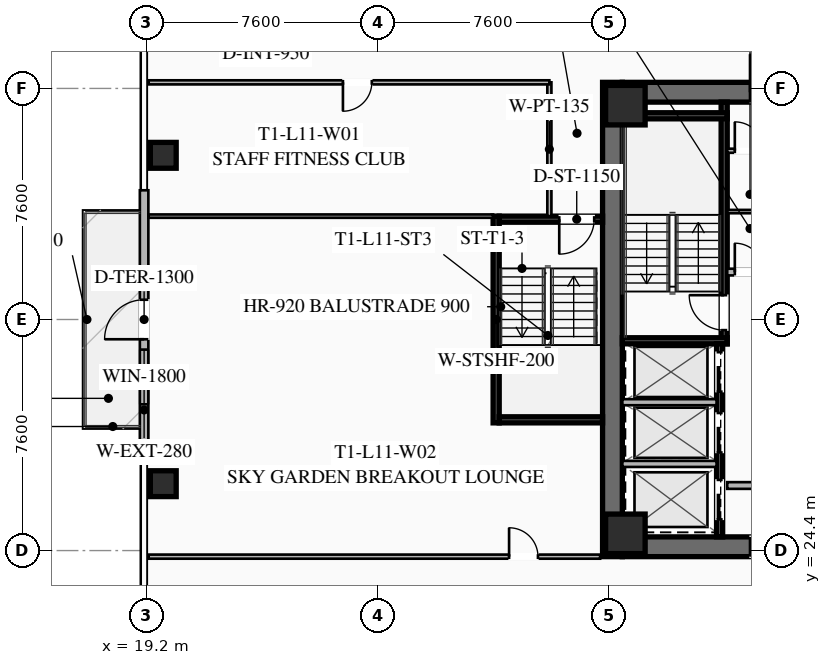
"""IFC4 building model, lengths in metres.
Left out: names, types, materials, properties, quantities, classifications, styles, units other than length and angle.
Written with IfcOpenShell. Run it as: python <this file> out.ifc"""

import sys

from ifc_helpers import new_model, si_unit, direction, frame, frame_2d, origin, origin_2d, place, context, subcontext, project, spatial, rectangle, hollow_rectangle, extrude, element, fill, save


model = new_model("IFC4")
c1 = context("Model", 3, precision=1e-05, world=origin(), true_north=direction((0.0, 1.0)))
c2 = subcontext(c1, "Body", "Model", "MODEL_VIEW")
j1 = project(units=[si_unit("LENGTHUNIT", "METRE"), si_unit("PLANEANGLEUNIT", "RADIAN")], contexts=[c1])
p1 = place(None, origin())
s1 = spatial("IfcSite", under=j1, at=p1, CompositionType="ELEMENT")
p2 = place(p1, origin())
s2 = spatial("IfcBuilding", under=s1, at=p2, CompositionType="ELEMENT")
p3 = place(p2, frame((0.0, 0.0, 45.9)))
s3 = spatial("IfcBuildingStorey", under=s2, at=p3, CompositionType="ELEMENT", Elevation=45.9)
p4 = place(p3, frame((34.525, 24.2, 0.0), z_axis=(0.0, 0.0, 1.0), x_axis=(0.0, 1.0, 0.0)))
e1 = element("IfcWall", 1, at=p4, inside=s3, PredefinedType="SHEAR", context=c2, shape_type="SweptSolid", body=[
    extrude(rectangle(XDim=15.6, YDim=0.65, at=frame_2d((7.8, 0.0))), origin(), (0.0, 0.0, 1.0), 3.55),
])
p5 = place(p3, frame((49.15, 24.525, 0.0), z_axis=(0.0, 0.0, 1.0), x_axis=(-1.0, 0.0, 0.0)))
e2 = element("IfcWall", 2, at=p5, inside=s3, PredefinedType="SHEAR", context=c2, shape_type="SweptSolid", body=[
    extrude(rectangle(XDim=14.3, YDim=0.65, at=frame_2d((7.15, 0.0))), origin(), (0.0, 0.0, 1.0), 3.55),
])
p6 = place(p5, frame((8.85, 0.0, 0.0)))
e3 = element("IfcOpeningElement", 3, at=p6, cuts=e2, PredefinedType="OPENING", context=c2, shape_type="SweptSolid", body=[
    extrude(rectangle(XDim=1.25, YDim=2.25, at=frame_2d((0.625, 1.125))), frame((0.0, 0.335, 0.0), z_axis=(0.0, -1.0, 0.0), x_axis=(1.0, 0.0, 0.0)), (0.0, 0.0, 1.0), 0.67),
])
p7 = place(p5, frame((3.8, 0.0, 0.0)))
e4 = element("IfcOpeningElement", 4, at=p7, cuts=e2, PredefinedType="OPENING", context=c2, shape_type="SweptSolid", body=[
    extrude(rectangle(XDim=1.25, YDim=2.25, at=frame_2d((0.625, 1.125))), frame((0.0, 0.335, 0.0), z_axis=(0.0, -1.0, 0.0), x_axis=(1.0, 0.0, 0.0)), (0.0, 0.0, 1.0), 0.67),
])
p8 = place(p3, frame((34.85, 39.475, 0.0), z_axis=(0.0, 0.0, 1.0), x_axis=(1.0, 0.0, 0.0)))
e5 = element("IfcWall", 5, at=p8, inside=s3, PredefinedType="SHEAR", context=c2, shape_type="SweptSolid", body=[
    extrude(rectangle(XDim=14.3, YDim=0.65, at=frame_2d((7.15, 0.0))), origin(), (0.0, 0.0, 1.0), 3.55),
])
p9 = place(p8, frame((4.2, 0.0, 0.0)))
e6 = element("IfcOpeningElement", 6, at=p9, cuts=e5, PredefinedType="OPENING", context=c2, shape_type="SweptSolid", body=[
    extrude(rectangle(XDim=1.25, YDim=2.25, at=frame_2d((0.625, 1.125))), frame((0.0, 0.335, 0.0), z_axis=(0.0, -1.0, 0.0), x_axis=(1.0, 0.0, 0.0)), (0.0, 0.0, 1.0), 0.67),
])
p10 = place(p8, frame((9.25, 0.0, 0.0)))
e7 = element("IfcOpeningElement", 7, at=p10, cuts=e5, PredefinedType="OPENING", context=c2, shape_type="SweptSolid", body=[
    extrude(rectangle(XDim=1.25, YDim=2.25, at=frame_2d((0.625, 1.125))), frame((0.0, 0.335, 0.0), z_axis=(0.0, -1.0, 0.0), x_axis=(1.0, 0.0, 0.0)), (0.0, 0.0, 1.0), 0.67),
])
for number, where, z_axis, x_axis in (
    (8, (34.95, 24.95, 0.0), (0.0, 0.0, 1.0), (1.0, 0.0, 0.0)),
    (9, (34.95, 39.05, 0.0), (0.0, 0.0, 1.0), (1.0, 0.0, 0.0)),
):
    element("IfcColumn", number, at=place(p3, frame(where, z_axis=z_axis, x_axis=x_axis)), inside=s3, PredefinedType="COLUMN", context=c2, shape_type="SweptSolid", body=[
        extrude(hollow_rectangle(XDim=1.3, YDim=1.3, WallThickness=0.05, at=origin_2d()), origin(), (0.0, 0.0, 1.0), 3.35),
    ])
for number, where, z_axis, x_axis in (
    (10, (19.75, 37.4, 0.0), (0.0, 0.0, 1.0), (1.0, 0.0, 0.0)),
    (11, (19.75, 26.6, 0.0), (0.0, 0.0, 1.0), (1.0, 0.0, 0.0)),
):
    element("IfcColumn", number, at=place(p3, frame(where, z_axis=z_axis, x_axis=x_axis)), inside=s3, PredefinedType="COLUMN", context=c2, shape_type="SweptSolid", body=[
        extrude(hollow_rectangle(XDim=0.85, YDim=0.85, WallThickness=0.035, at=origin_2d()), origin(), (0.0, 0.0, 1.0), 3.35),
    ])
p11 = place(p3, frame((19.12, 27.75, 0.0), z_axis=(0.0, 0.0, 1.0), x_axis=(0.0, 1.0, 0.0)))
e12 = element("IfcWall", 12, at=p11, inside=s3, PredefinedType="SOLIDWALL", context=c2, shape_type="SweptSolid", body=[
    extrude(rectangle(XDim=8.5, YDim=0.28, at=frame_2d((4.25, 0.0))), origin(), (0.0, 0.0, 1.0), 3.35),
])
p12 = place(p11, frame((3.6, 0.0, 0.0)))
e13 = element("IfcOpeningElement", 13, at=p12, cuts=e12, PredefinedType="OPENING", context=c2, shape_type="SweptSolid", body=[
    extrude(rectangle(XDim=1.3, YDim=2.15, at=frame_2d((0.65, 1.075))), frame((0.0, 0.15, 0.0), z_axis=(0.0, -1.0, 0.0), x_axis=(1.0, 0.0, 0.0)), (0.0, 0.0, 1.0), 0.3),
])
p13 = place(p11, frame((1.46, 0.0, 0.85)))
e14 = element("IfcOpeningElement", 14, at=p13, cuts=e12, PredefinedType="OPENING", context=c2, shape_type="SweptSolid", body=[
    extrude(rectangle(XDim=1.8, YDim=1.92, at=frame_2d((0.9, 0.96))), frame((0.0, 0.15, 0.0), z_axis=(0.0, -1.0, 0.0), x_axis=(1.0, 0.0, 0.0)), (0.0, 0.0, 1.0), 0.3),
])
p14 = place(p3, frame((38.2, 31.2, 0.0), z_axis=(0.0, 0.0, 1.0), x_axis=(0.0, 1.0, 0.0)))
e15 = element("IfcWall", 15, at=p14, inside=s3, PredefinedType="SHEAR", context=c2, shape_type="SweptSolid", body=[
    extrude(rectangle(XDim=7.95, YDim=0.2, at=frame_2d((3.975, 0.0))), origin(), (0.0, 0.0, 1.0), 3.35),
])
p15 = place(p14, frame((0.45, 0.0, 0.0)))
e16 = element("IfcOpeningElement", 16, at=p15, cuts=e15, PredefinedType="OPENING", context=c2, shape_type="SweptSolid", body=[
    extrude(rectangle(XDim=1.15, YDim=2.2, at=frame_2d((0.575, 1.1))), frame((0.0, 0.11, 0.0), z_axis=(0.0, -1.0, 0.0), x_axis=(1.0, 0.0, 0.0)), (0.0, 0.0, 1.0), 0.22),
])
for number, where, z_axis, x_axis in (
    (17, (34.85, 31.3, 0.0), (0.0, 0.0, 1.0), (1.0, 0.0, 0.0)),
    (18, (34.85, 38.7, 0.0), (0.0, 0.0, 1.0), (1.0, 0.0, 0.0)),
):
    element("IfcWall", number, at=place(p3, frame(where, z_axis=z_axis, x_axis=x_axis)), inside=s3, PredefinedType="SHEAR", context=c2, shape_type="SweptSolid", body=[
        extrude(rectangle(XDim=3.45, YDim=0.2, at=frame_2d((1.725, 0.0))), origin(), (0.0, 0.0, 1.0), 3.35),
    ])
p16 = place(p3, frame((38.3, 33.56, 0.0), z_axis=(0.0, 0.0, 1.0), x_axis=(1.0, 0.0, 0.0)))
e19 = element("IfcWall", 19, at=p16, inside=s3, PredefinedType="SOLIDWALL", context=c2, shape_type="SweptSolid", body=[
    extrude(rectangle(XDim=3.15, YDim=0.22, at=frame_2d((1.575, 0.0))), origin(), (0.0, 0.0, 1.0), 2.703),
])
p17 = place(p16, frame((0.25, 0.0, 0.0)))
e20 = element("IfcOpeningElement", 20, at=p17, cuts=e19, PredefinedType="OPENING", context=c2, shape_type="SweptSolid", body=[
    extrude(rectangle(XDim=0.95, YDim=2.05, at=frame_2d((0.475, 1.025))), frame((0.0, 0.12, 0.0), z_axis=(0.0, -1.0, 0.0), x_axis=(1.0, 0.0, 0.0)), (0.0, 0.0, 1.0), 0.24),
])
p18 = place(p16, frame((1.95, 0.0, 0.0)))
e21 = element("IfcOpeningElement", 21, at=p18, cuts=e19, PredefinedType="OPENING", context=c2, shape_type="SweptSolid", body=[
    extrude(rectangle(XDim=0.95, YDim=2.05, at=frame_2d((0.475, 1.025))), frame((0.0, 0.12, 0.0), z_axis=(0.0, -1.0, 0.0), x_axis=(1.0, 0.0, 0.0)), (0.0, 0.0, 1.0), 0.24),
])
p19 = place(p3, frame((38.3, 26.54, 0.0), z_axis=(0.0, 0.0, 1.0), x_axis=(1.0, 0.0, 0.0)))
e22 = element("IfcWall", 22, at=p19, inside=s3, PredefinedType="SOLIDWALL", context=c2, shape_type="SweptSolid", body=[
    extrude(rectangle(XDim=3.15, YDim=0.22, at=frame_2d((1.575, 0.0))), origin(), (0.0, 0.0, 1.0), 2.703),
])
p20 = place(p19, frame((0.95, 0.0, 0.0)))
e23 = element("IfcOpeningElement", 23, at=p20, cuts=e22, PredefinedType="OPENING", context=c2, shape_type="SweptSolid", body=[
    extrude(rectangle(XDim=1.25, YDim=2.25, at=frame_2d((0.625, 1.125))), frame((0.0, 0.12, 0.0), z_axis=(0.0, -1.0, 0.0), x_axis=(1.0, 0.0, 0.0)), (0.0, 0.0, 1.0), 0.24),
])
p21 = place(p3, frame((38.05, 24.85, 0.0), z_axis=(0.0, 0.0, 1.0), x_axis=(0.0, 1.0, 0.0)))
e24 = element("IfcWall", 24, at=p21, inside=s3, PredefinedType="SHEAR", context=c2, shape_type="SweptSolid", body=[
    extrude(rectangle(XDim=6.35, YDim=0.2, at=frame_2d((3.175, 0.0))), origin(), (0.0, 0.0, 1.0), 3.35),
])
p22 = place(p21, frame((4.775, 0.0, 0.0)))
e25 = element("IfcOpeningElement", 25, at=p22, cuts=e24, PredefinedType="OPENING", context=c2, shape_type="SweptSolid", body=[
    extrude(rectangle(XDim=1.3, YDim=2.25, at=frame_2d((0.65, 1.125))), frame((0.0, 0.11, 0.0), z_axis=(0.0, -1.0, 0.0), x_axis=(1.0, 0.0, 0.0)), (0.0, 0.0, 1.0), 0.22),
])
p23 = place(p21, frame((2.775, 0.0, 0.0)))
e26 = element("IfcOpeningElement", 26, at=p23, cuts=e24, PredefinedType="OPENING", context=c2, shape_type="SweptSolid", body=[
    extrude(rectangle(XDim=1.3, YDim=2.25, at=frame_2d((0.65, 1.125))), frame((0.0, 0.11, 0.0), z_axis=(0.0, -1.0, 0.0), x_axis=(1.0, 0.0, 0.0)), (0.0, 0.0, 1.0), 0.22),
])
p24 = place(p21, frame((0.575, 0.0, 0.0)))
e27 = element("IfcOpeningElement", 27, at=p24, cuts=e24, PredefinedType="OPENING", context=c2, shape_type="SweptSolid", body=[
    extrude(rectangle(XDim=1.3, YDim=2.25, at=frame_2d((0.65, 1.125))), frame((0.0, 0.11, 0.0), z_axis=(0.0, -1.0, 0.0), x_axis=(1.0, 0.0, 0.0)), (0.0, 0.0, 1.0), 0.22),
])
for number, where, z_axis, x_axis in (
    (28, (34.85, 27.25, 0.0), (0.0, 0.0, 1.0), (1.0, 0.0, 0.0)),
    (29, (34.85, 29.28, 0.0), (0.0, 0.0, 1.0), (1.0, 0.0, 0.0)),
):
    element("IfcWall", number, at=place(p3, frame(where, z_axis=z_axis, x_axis=x_axis)), inside=s3, PredefinedType="SOLIDWALL", context=c2, shape_type="SweptSolid", body=[
        extrude(rectangle(XDim=3.1, YDim=0.2, at=frame_2d((1.55, 0.0))), origin(), (0.0, 0.0, 1.0), 3.35),
    ])
p25 = place(p3, frame((38.3, 37.55, 0.0), z_axis=(0.0, 0.0, 1.0), x_axis=(1.0, 0.0, 0.0)))
e30 = element("IfcWall", 30, at=p25, inside=s3, PredefinedType="PARTITIONING", context=c2, shape_type="SweptSolid", body=[
    extrude(rectangle(XDim=3.15, YDim=0.135, at=frame_2d((1.575, 0.0))), origin(), (0.0, 0.0, 1.0), 2.703),
])
p26 = place(p25, frame((0.25, 0.0, 0.0)))
e31 = element("IfcOpeningElement", 31, at=p26, cuts=e30, PredefinedType="OPENING", context=c2, shape_type="SweptSolid", body=[
    extrude(rectangle(XDim=0.95, YDim=2.05, at=frame_2d((0.475, 1.025))), frame((0.0, 0.077, 0.0), z_axis=(0.0, -1.0, 0.0), x_axis=(1.0, 0.0, 0.0)), (0.0, 0.0, 1.0), 0.155),
])
p27 = place(p25, frame((1.95, 0.0, 0.0)))
e32 = element("IfcOpeningElement", 32, at=p27, cuts=e30, PredefinedType="OPENING", context=c2, shape_type="SweptSolid", body=[
    extrude(rectangle(XDim=0.95, YDim=2.05, at=frame_2d((0.475, 1.025))), frame((0.0, 0.077, 0.0), z_axis=(0.0, -1.0, 0.0), x_axis=(1.0, 0.0, 0.0)), (0.0, 0.0, 1.0), 0.155),
])
p28 = place(p3, frame((38.3, 35.55, 0.0), z_axis=(0.0, 0.0, 1.0), x_axis=(1.0, 0.0, 0.0)))
e33 = element("IfcWall", 33, at=p28, inside=s3, PredefinedType="PARTITIONING", context=c2, shape_type="SweptSolid", body=[
    extrude(rectangle(XDim=3.15, YDim=0.11, at=frame_2d((1.575, 0.0))), origin(), (0.0, 0.0, 1.0), 2.703),
])
p29 = place(p3, frame((30.7, 28.6, 0.0), z_axis=(0.0, 0.0, 1.0), x_axis=(0.0, 1.0, 0.0)))
e34 = element("IfcWall", 34, at=p29, inside=s3, PredefinedType="SHEAR", context=c2, shape_type="SweptSolid", body=[
    extrude(rectangle(XDim=6.8, YDim=0.2, at=frame_2d((3.4, 0.0))), origin(), (0.0, 0.0, 1.0), 3.35),
])
p30 = place(p3, frame((34.2, 35.3, 0.0), z_axis=(0.0, 0.0, 1.0), x_axis=(-1.0, 0.0, 0.0)))
e35 = element("IfcWall", 35, at=p30, inside=s3, PredefinedType="SHEAR", context=c2, shape_type="SweptSolid", body=[
    extrude(rectangle(XDim=3.4, YDim=0.2, at=frame_2d((1.7, 0.0))), origin(), (0.0, 0.0, 1.0), 3.35),
])
p31 = place(p30, frame((0.275, 0.0, 0.0)))
e36 = element("IfcOpeningElement", 36, at=p31, cuts=e35, PredefinedType="OPENING", context=c2, shape_type="SweptSolid", body=[
    extrude(rectangle(XDim=1.15, YDim=2.2, at=frame_2d((0.575, 1.1))), frame((0.0, 0.11, 0.0), z_axis=(0.0, -1.0, 0.0), x_axis=(1.0, 0.0, 0.0)), (0.0, 0.0, 1.0), 0.22),
])
p32 = place(p3, frame((30.8, 28.7, 0.0), z_axis=(0.0, 0.0, 1.0), x_axis=(1.0, 0.0, 0.0)))
e37 = element("IfcWall", 37, at=p32, inside=s3, PredefinedType="SHEAR", context=c2, shape_type="SweptSolid", body=[
    extrude(rectangle(XDim=3.4, YDim=0.2, at=frame_2d((1.7, 0.0))), origin(), (0.0, 0.0, 1.0), 3.35),
])
p33 = place(p3, frame((32.45, 35.4, 0.0), z_axis=(0.0, 0.0, 1.0), x_axis=(0.0, 1.0, 0.0)))
e38 = element("IfcWall", 38, at=p33, inside=s3, PredefinedType="PARTITIONING", context=c2, shape_type="SweptSolid", body=[
    extrude(rectangle(XDim=4.4, YDim=0.135, at=frame_2d((2.2, 0.0))), origin(), (0.0, 0.0, 1.0), 2.703),
])
p34 = place(p3, frame((32.45, 39.8, 0.0), z_axis=(0.0, 0.0, 1.0), x_axis=(-1.0, 0.0, 0.0)))
e39 = element("IfcWall", 39, at=p34, inside=s3, PredefinedType="PARTITIONING", context=c2, shape_type="SweptSolid", body=[
    extrude(rectangle(XDim=13.18, YDim=0.135, at=frame_2d((6.59, 0.0))), origin(), (0.0, 0.0, 1.0), 2.703),
])
p35 = place(p34, frame((5.84, 0.0, 0.0)))
e40 = element("IfcOpeningElement", 40, at=p35, cuts=e39, PredefinedType="OPENING", context=c2, shape_type="SweptSolid", body=[
    extrude(rectangle(XDim=0.95, YDim=2.05, at=frame_2d((0.475, 1.025))), frame((0.0, 0.077, 0.0), z_axis=(0.0, -1.0, 0.0), x_axis=(1.0, 0.0, 0.0)), (0.0, 0.0, 1.0), 0.155),
])
p36 = place(p3, frame((19.27, 24.2, 0.0), z_axis=(0.0, 0.0, 1.0), x_axis=(1.0, 0.0, 0.0)))
e41 = element("IfcWall", 41, at=p36, inside=s3, PredefinedType="PARTITIONING", context=c2, shape_type="SweptSolid", body=[
    extrude(rectangle(XDim=14.85, YDim=0.135, at=frame_2d((7.425, 0.0))), origin(), (0.0, 0.0, 1.0), 2.703),
])
p37 = place(p36, frame((11.855, 0.0, 0.0)))
e42 = element("IfcOpeningElement", 42, at=p37, cuts=e41, PredefinedType="OPENING", context=c2, shape_type="SweptSolid", body=[
    extrude(rectangle(XDim=0.95, YDim=2.05, at=frame_2d((0.475, 1.025))), frame((0.0, 0.077, 0.0), z_axis=(0.0, -1.0, 0.0), x_axis=(1.0, 0.0, 0.0)), (0.0, 0.0, 1.0), 0.155),
])
p38 = place(p3, frame((30.6, 35.4, 0.0), z_axis=(0.0, 0.0, 1.0), x_axis=(-1.0, 0.0, 0.0)))
e43 = element("IfcWall", 43, at=p38, inside=s3, PredefinedType="PARTITIONING", context=c2, shape_type="SweptSolid", body=[
    extrude(rectangle(XDim=11.33, YDim=0.11, at=frame_2d((5.665, 0.0))), origin(), (0.0, 0.0, 1.0), 2.703),
])
p39 = place(p12, origin())
e44 = element("IfcDoor", 44, at=p39, inside=s3, OperationType="SINGLE_SWING_LEFT", PredefinedType="DOOR", context=c2, shape_type="SweptSolid", body=[
    extrude(rectangle(XDim=1.3, YDim=2.15, at=frame_2d((0.65, 1.075))), frame((0.0, 0.025, 0.0), z_axis=(0.0, -1.0, 0.0), x_axis=(1.0, 0.0, 0.0)), (0.0, 0.0, 1.0), 0.05),
])
fill(e13, e44)
p40 = place(p13, origin())
e45 = element("IfcWindow", 45, at=p40, inside=s3, PartitioningType="SINGLE_PANEL", PredefinedType="WINDOW", context=c2, shape_type="SweptSolid", body=[
    extrude(rectangle(XDim=1.8, YDim=1.92, at=frame_2d((0.9, 0.96))), frame((0.0, 0.03, 0.0), z_axis=(0.0, -1.0, 0.0), x_axis=(1.0, 0.0, 0.0)), (0.0, 0.0, 1.0), 0.06),
])
fill(e14, e45)
p41 = place(p9, origin())
e46 = element("IfcDoor", 46, at=p41, inside=s3, OperationType="SINGLE_SWING_LEFT", PredefinedType="DOOR", context=c2, shape_type="SweptSolid", body=[
    extrude(rectangle(XDim=1.25, YDim=2.25, at=frame_2d((0.625, 1.125))), frame((0.0, 0.025, 0.0), z_axis=(0.0, -1.0, 0.0), x_axis=(1.0, 0.0, 0.0)), (0.0, 0.0, 1.0), 0.05),
])
fill(e6, e46)
p42 = place(p6, origin())
e47 = element("IfcDoor", 47, at=p42, inside=s3, OperationType="SINGLE_SWING_LEFT", PredefinedType="DOOR", context=c2, shape_type="SweptSolid", body=[
    extrude(rectangle(XDim=1.25, YDim=2.25, at=frame_2d((0.625, 1.125))), frame((0.0, 0.025, 0.0), z_axis=(0.0, -1.0, 0.0), x_axis=(1.0, 0.0, 0.0)), (0.0, 0.0, 1.0), 0.05),
])
fill(e3, e47)
p43 = place(p15, origin())
e48 = element("IfcDoor", 48, at=p43, inside=s3, OperationType="SINGLE_SWING_RIGHT", PredefinedType="DOOR", context=c2, shape_type="SweptSolid", body=[
    extrude(rectangle(XDim=1.15, YDim=2.2, at=frame_2d((0.575, 1.1))), frame((0.0, 0.025, 0.0), z_axis=(0.0, -1.0, 0.0), x_axis=(1.0, 0.0, 0.0)), (0.0, 0.0, 1.0), 0.05),
])
fill(e16, e48)
p44 = place(p26, origin())
e49 = element("IfcDoor", 49, at=p44, inside=s3, OperationType="SINGLE_SWING_LEFT", PredefinedType="DOOR", context=c2, shape_type="SweptSolid", body=[
    extrude(rectangle(XDim=0.95, YDim=2.05, at=frame_2d((0.475, 1.025))), frame((0.0, 0.025, 0.0), z_axis=(0.0, -1.0, 0.0), x_axis=(1.0, 0.0, 0.0)), (0.0, 0.0, 1.0), 0.05),
])
fill(e31, e49)
p45 = place(p17, origin())
e50 = element("IfcDoor", 50, at=p45, inside=s3, OperationType="SINGLE_SWING_LEFT", PredefinedType="DOOR", context=c2, shape_type="SweptSolid", body=[
    extrude(rectangle(XDim=0.95, YDim=2.05, at=frame_2d((0.475, 1.025))), frame((0.0, 0.025, 0.0), z_axis=(0.0, -1.0, 0.0), x_axis=(1.0, 0.0, 0.0)), (0.0, 0.0, 1.0), 0.05),
])
fill(e20, e50)
p46 = place(p31, origin())
e51 = element("IfcDoor", 51, at=p46, inside=s3, OperationType="SINGLE_SWING_RIGHT", PredefinedType="DOOR", context=c2, shape_type="SweptSolid", body=[
    extrude(rectangle(XDim=1.15, YDim=2.2, at=frame_2d((0.575, 1.1))), frame((0.0, 0.025, 0.0), z_axis=(0.0, -1.0, 0.0), x_axis=(1.0, 0.0, 0.0)), (0.0, 0.0, 1.0), 0.05),
])
fill(e36, e51)
p47 = place(p35, origin())
e52 = element("IfcDoor", 52, at=p47, inside=s3, OperationType="SINGLE_SWING_RIGHT", PredefinedType="DOOR", context=c2, shape_type="SweptSolid", body=[
    extrude(rectangle(XDim=0.95, YDim=2.05, at=frame_2d((0.475, 1.025))), frame((0.0, 0.025, 0.0), z_axis=(0.0, -1.0, 0.0), x_axis=(1.0, 0.0, 0.0)), (0.0, 0.0, 1.0), 0.05),
])
fill(e40, e52)
p48 = place(p37, origin())
e53 = element("IfcDoor", 53, at=p48, inside=s3, OperationType="SINGLE_SWING_LEFT", PredefinedType="DOOR", context=c2, shape_type="SweptSolid", body=[
    extrude(rectangle(XDim=0.95, YDim=2.05, at=frame_2d((0.475, 1.025))), frame((0.0, 0.025, 0.0), z_axis=(0.0, -1.0, 0.0), x_axis=(1.0, 0.0, 0.0)), (0.0, 0.0, 1.0), 0.05),
])
fill(e42, e53)
p49 = place(p22, origin())
e54 = element("IfcDoor", 54, at=p49, inside=s3, OperationType="SLIDING_TO_LEFT", PredefinedType="DOOR", context=c2, shape_type="SweptSolid", body=[
    extrude(rectangle(XDim=1.3, YDim=2.25, at=frame_2d((0.65, 1.125))), frame((0.0, 0.025, 0.0), z_axis=(0.0, -1.0, 0.0), x_axis=(1.0, 0.0, 0.0)), (0.0, 0.0, 1.0), 0.05),
])
fill(e25, e54)
p50 = place(p23, origin())
e55 = element("IfcDoor", 55, at=p50, inside=s3, OperationType="SLIDING_TO_LEFT", PredefinedType="DOOR", context=c2, shape_type="SweptSolid", body=[
    extrude(rectangle(XDim=1.3, YDim=2.25, at=frame_2d((0.65, 1.125))), frame((0.0, 0.025, 0.0), z_axis=(0.0, -1.0, 0.0), x_axis=(1.0, 0.0, 0.0)), (0.0, 0.0, 1.0), 0.05),
])
fill(e26, e55)
p51 = place(p24, origin())
e56 = element("IfcDoor", 56, at=p51, inside=s3, OperationType="SLIDING_TO_LEFT", PredefinedType="DOOR", context=c2, shape_type="SweptSolid", body=[
    extrude(rectangle(XDim=1.3, YDim=2.25, at=frame_2d((0.65, 1.125))), frame((0.0, 0.025, 0.0), z_axis=(0.0, -1.0, 0.0), x_axis=(1.0, 0.0, 0.0)), (0.0, 0.0, 1.0), 0.05),
])
fill(e27, e56)
save(model, sys.argv[1])
